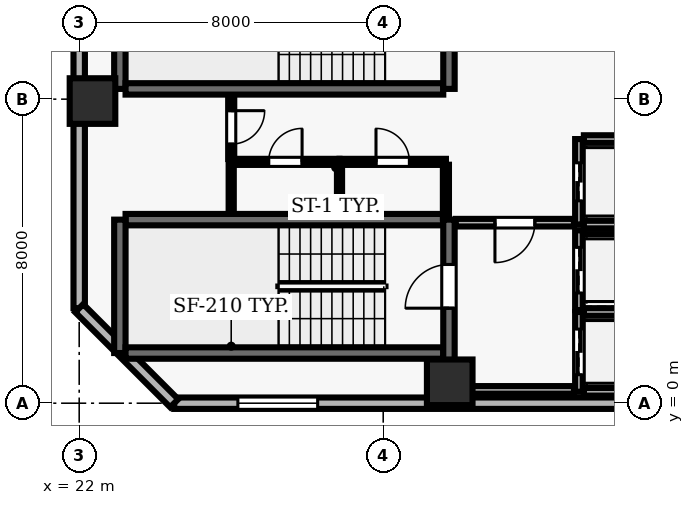
"""IFC4 building model, lengths in metres.
Left out: names, types, materials, properties, quantities, classifications, styles, units other than length and angle.
Written with IfcOpenShell. Run it as: python <this file> out.ifc"""

import sys

from ifc_helpers import new_model, si_unit, direction, frame, frame_2d, origin, origin_2d, place, context, subcontext, project, spatial, rectangle, extrude, element, fill, save


model = new_model("IFC4")
c1 = context("Model", 3, precision=1e-05, world=origin(), true_north=direction((0.0, 1.0)))
c2 = subcontext(c1, "Body", "Model", "MODEL_VIEW")
j1 = project(units=[si_unit("LENGTHUNIT", "METRE"), si_unit("PLANEANGLEUNIT", "RADIAN")], contexts=[c1])
p1 = place(None, origin())
s1 = spatial("IfcSite", under=j1, at=p1, CompositionType="ELEMENT")
p2 = place(p1, origin())
s2 = spatial("IfcBuilding", under=s1, at=p2, CompositionType="ELEMENT")
p3 = place(p2, frame((0.0, 0.0, 115.1)))
s3 = spatial("IfcBuildingStorey", under=s2, at=p3, CompositionType="ELEMENT", Elevation=115.1)
for number, where, z_axis, x_axis in (
    (1, (31.75, 0.55, 0.0), (0.0, 0.0, 1.0), (1.0, 0.0, 0.0)),
    (2, (22.35, 7.95, 0.0), (0.0, 0.0, 1.0), (1.0, 0.0, 0.0)),
):
    element("IfcColumn", number, at=place(p3, frame(where, z_axis=z_axis, x_axis=x_axis)), inside=s3, PredefinedType="COLUMN", context=c2, shape_type="SweptSolid", body=[
        extrude(rectangle(XDim=1.2, YDim=1.2, at=origin_2d()), origin(), (0.0, 0.0, 1.0), 3.9),
    ])
p4 = place(p3, frame((24.5, 0.0, 0.0), z_axis=(0.0, 0.0, 1.0), x_axis=(1.0, 0.0, 0.0)))
e3 = element("IfcWall", 3, at=p4, inside=s3, PredefinedType="SOLIDWALL", context=c2, shape_type="SweptSolid", body=[
    extrude(rectangle(XDim=43.6, YDim=0.3, at=frame_2d((21.8, 0.0))), origin(), (0.0, 0.0, 1.0), 3.69),
])
p5 = place(p4, frame((1.675, 0.0, 0.9)))
e4 = element("IfcOpeningElement", 4, at=p5, cuts=e3, PredefinedType="OPENING", context=c2, shape_type="SweptSolid", body=[
    extrude(rectangle(XDim=2.1, YDim=1.6, at=frame_2d((1.05, 0.8))), frame((0.0, 0.16, 0.0), z_axis=(0.0, -1.0, 0.0), x_axis=(1.0, 0.0, 0.0)), (0.0, 0.0, 1.0), 0.32),
])
p6 = place(p4, frame((18.025, 0.0, 0.9)))
e5 = element("IfcOpeningElement", 5, at=p6, cuts=e3, PredefinedType="OPENING", context=c2, shape_type="SweptSolid", body=[
    extrude(rectangle(XDim=2.1, YDim=1.6, at=frame_2d((1.05, 0.8))), frame((0.0, 0.16, 0.0), z_axis=(0.0, -1.0, 0.0), x_axis=(1.0, 0.0, 0.0)), (0.0, 0.0, 1.0), 0.32),
])
p7 = place(p4, frame((23.475, 0.0, 0.9)))
e6 = element("IfcOpeningElement", 6, at=p7, cuts=e3, PredefinedType="OPENING", context=c2, shape_type="SweptSolid", body=[
    extrude(rectangle(XDim=2.1, YDim=1.6, at=frame_2d((1.05, 0.8))), frame((0.0, 0.16, 0.0), z_axis=(0.0, -1.0, 0.0), x_axis=(1.0, 0.0, 0.0)), (0.0, 0.0, 1.0), 0.32),
])
p8 = place(p4, frame((28.025, 0.0, 0.9)))
e7 = element("IfcOpeningElement", 7, at=p8, cuts=e3, PredefinedType="OPENING", context=c2, shape_type="SweptSolid", body=[
    extrude(rectangle(XDim=2.1, YDim=1.6, at=frame_2d((1.05, 0.8))), frame((0.0, 0.16, 0.0), z_axis=(0.0, -1.0, 0.0), x_axis=(1.0, 0.0, 0.0)), (0.0, 0.0, 1.0), 0.32),
])
p9 = place(p4, frame((34.375, 0.0, 0.9)))
e8 = element("IfcOpeningElement", 8, at=p9, cuts=e3, PredefinedType="OPENING", context=c2, shape_type="SweptSolid", body=[
    extrude(rectangle(XDim=2.1, YDim=1.6, at=frame_2d((1.05, 0.8))), frame((0.0, 0.16, 0.0), z_axis=(0.0, -1.0, 0.0), x_axis=(1.0, 0.0, 0.0)), (0.0, 0.0, 1.0), 0.32),
])
p10 = place(p4, frame((39.825, 0.0, 0.9)))
e9 = element("IfcOpeningElement", 9, at=p10, cuts=e3, PredefinedType="OPENING", context=c2, shape_type="SweptSolid", body=[
    extrude(rectangle(XDim=2.1, YDim=1.6, at=frame_2d((1.05, 0.8))), frame((0.0, 0.16, 0.0), z_axis=(0.0, -1.0, 0.0), x_axis=(1.0, 0.0, 0.0)), (0.0, 0.0, 1.0), 0.32),
])
p11 = place(p3, frame((22.0, 46.1, 0.0), z_axis=(0.0, 0.0, 1.0), x_axis=(0.0, -1.0, 0.0)))
e10 = element("IfcWall", 10, at=p11, inside=s3, PredefinedType="SOLIDWALL", context=c2, shape_type="SweptSolid", body=[
    extrude(rectangle(XDim=43.6, YDim=0.3, at=frame_2d((21.8, 0.0))), origin(), (0.0, 0.0, 1.0), 3.69),
])
p12 = place(p11, frame((12.7, 0.0, 0.0)))
e11 = element("IfcOpeningElement", 11, at=p12, cuts=e10, PredefinedType="OPENING", context=c2, shape_type="SweptSolid", body=[
    extrude(rectangle(XDim=1.0, YDim=2.2, at=frame_2d((0.5, 1.1))), frame((0.0, 0.16, 0.0), z_axis=(0.0, -1.0, 0.0), x_axis=(1.0, 0.0, 0.0)), (0.0, 0.0, 1.0), 0.32),
])
p13 = place(p11, frame((17.125, 0.0, 0.9)))
e12 = element("IfcOpeningElement", 12, at=p13, cuts=e10, PredefinedType="OPENING", context=c2, shape_type="SweptSolid", body=[
    extrude(rectangle(XDim=2.1, YDim=1.6, at=frame_2d((1.05, 0.8))), frame((0.0, 0.16, 0.0), z_axis=(0.0, -1.0, 0.0), x_axis=(1.0, 0.0, 0.0)), (0.0, 0.0, 1.0), 0.32),
])
p14 = place(p11, frame((23.475, 0.0, 0.9)))
e13 = element("IfcOpeningElement", 13, at=p14, cuts=e10, PredefinedType="OPENING", context=c2, shape_type="SweptSolid", body=[
    extrude(rectangle(XDim=2.1, YDim=1.6, at=frame_2d((1.05, 0.8))), frame((0.0, 0.16, 0.0), z_axis=(0.0, -1.0, 0.0), x_axis=(1.0, 0.0, 0.0)), (0.0, 0.0, 1.0), 0.32),
])
p15 = place(p11, frame((28.475, 0.0, 0.9)))
e14 = element("IfcOpeningElement", 14, at=p15, cuts=e10, PredefinedType="OPENING", context=c2, shape_type="SweptSolid", body=[
    extrude(rectangle(XDim=2.1, YDim=1.6, at=frame_2d((1.05, 0.8))), frame((0.0, 0.16, 0.0), z_axis=(0.0, -1.0, 0.0), x_axis=(1.0, 0.0, 0.0)), (0.0, 0.0, 1.0), 0.32),
])
p16 = place(p11, frame((34.375, 0.0, 0.9)))
e15 = element("IfcOpeningElement", 15, at=p16, cuts=e10, PredefinedType="OPENING", context=c2, shape_type="SweptSolid", body=[
    extrude(rectangle(XDim=2.1, YDim=1.6, at=frame_2d((1.05, 0.8))), frame((0.0, 0.16, 0.0), z_axis=(0.0, -1.0, 0.0), x_axis=(1.0, 0.0, 0.0)), (0.0, 0.0, 1.0), 0.32),
])
p17 = place(p3, frame((22.0, 2.5, 0.0), z_axis=(0.0, 0.0, 1.0), x_axis=(0.707106781187, -0.707106781187, 0.0)))
e16 = element("IfcWall", 16, at=p17, inside=s3, PredefinedType="SOLIDWALL", context=c2, shape_type="SweptSolid", body=[
    extrude(rectangle(XDim=3.536, YDim=0.3, at=frame_2d((1.768, 0.0))), origin(), (0.0, 0.0, 1.0), 3.69),
])
p18 = place(p3, frame((31.58, 4.83, 0.0), z_axis=(0.0, 0.0, 1.0), x_axis=(-1.0, 0.0, 0.0)))
e17 = element("IfcWall", 17, at=p18, inside=s3, PredefinedType="SHEAR", context=c2, shape_type="SweptSolid", body=[
    extrude(rectangle(XDim=8.36, YDim=0.3, at=frame_2d((4.18, 0.0))), origin(), (0.0, 0.0, 1.0), 3.69),
])
p19 = place(p3, frame((23.07, 4.83, 0.0), z_axis=(0.0, 0.0, 1.0), x_axis=(0.0, -1.0, 0.0)))
e18 = element("IfcWall", 18, at=p19, inside=s3, PredefinedType="SHEAR", context=c2, shape_type="SweptSolid", body=[
    extrude(rectangle(XDim=3.51, YDim=0.3, at=frame_2d((1.755, 0.0))), origin(), (0.0, 0.0, 1.0), 3.69),
])
p20 = place(p3, frame((23.22, 1.32, 0.0), z_axis=(0.0, 0.0, 1.0), x_axis=(1.0, 0.0, 0.0)))
e19 = element("IfcWall", 19, at=p20, inside=s3, PredefinedType="SHEAR", context=c2, shape_type="SweptSolid", body=[
    extrude(rectangle(XDim=8.36, YDim=0.3, at=frame_2d((4.18, 0.0))), origin(), (0.0, 0.0, 1.0), 3.69),
])
p21 = place(p3, frame((31.73, 0.96, 0.0), z_axis=(0.0, 0.0, 1.0), x_axis=(0.0, 1.0, 0.0)))
e20 = element("IfcWall", 20, at=p21, inside=s3, PredefinedType="SHEAR", context=c2, shape_type="SweptSolid", body=[
    extrude(rectangle(XDim=3.87, YDim=0.3, at=frame_2d((1.935, 0.0))), origin(), (0.0, 0.0, 1.0), 3.69),
])
p22 = place(p21, frame((1.54, 0.0, 0.0)))
e21 = element("IfcOpeningElement", 21, at=p22, cuts=e20, PredefinedType="OPENING", context=c2, shape_type="SweptSolid", body=[
    extrude(rectangle(XDim=1.15, YDim=2.15, at=frame_2d((0.575, 1.075))), frame((0.0, 0.16, 0.0), z_axis=(0.0, -1.0, 0.0), x_axis=(1.0, 0.0, 0.0)), (0.0, 0.0, 1.0), 0.32),
])
p23 = place(p3, frame((23.07, 11.78, 0.0), z_axis=(0.0, 0.0, 1.0), x_axis=(0.0, -1.0, 0.0)))
e22 = element("IfcWall", 22, at=p23, inside=s3, PredefinedType="SHEAR", context=c2, shape_type="SweptSolid", body=[
    extrude(rectangle(XDim=3.51, YDim=0.3, at=frame_2d((1.755, 0.0))), origin(), (0.0, 0.0, 1.0), 3.69),
])
p24 = place(p3, frame((23.22, 8.27, 0.0), z_axis=(0.0, 0.0, 1.0), x_axis=(1.0, 0.0, 0.0)))
e23 = element("IfcWall", 23, at=p24, inside=s3, PredefinedType="SHEAR", context=c2, shape_type="SweptSolid", body=[
    extrude(rectangle(XDim=8.36, YDim=0.3, at=frame_2d((4.18, 0.0))), origin(), (0.0, 0.0, 1.0), 3.69),
])
p25 = place(p3, frame((31.73, 8.27, 0.0), z_axis=(0.0, 0.0, 1.0), x_axis=(0.0, 1.0, 0.0)))
e24 = element("IfcWall", 24, at=p25, inside=s3, PredefinedType="SHEAR", context=c2, shape_type="SweptSolid", body=[
    extrude(rectangle(XDim=3.51, YDim=0.3, at=frame_2d((1.755, 0.0))), origin(), (0.0, 0.0, 1.0), 3.69),
])
p26 = place(p25, frame((1.18, 0.0, 0.0)))
e25 = element("IfcOpeningElement", 25, at=p26, cuts=e24, PredefinedType="OPENING", context=c2, shape_type="SweptSolid", body=[
    extrude(rectangle(XDim=1.15, YDim=2.15, at=frame_2d((0.575, 1.075))), frame((0.0, 0.16, 0.0), z_axis=(0.0, -1.0, 0.0), x_axis=(1.0, 0.0, 0.0)), (0.0, 0.0, 1.0), 0.32),
])
p27 = place(p3, frame((35.15, 2.4, 0.0), z_axis=(0.0, 0.0, 1.0), x_axis=(0.0, -1.0, 0.0)))
e26 = element("IfcWall", 26, at=p27, inside=s3, PredefinedType="SOLIDWALL", context=c2, shape_type="SweptSolid", body=[
    extrude(rectangle(XDim=2.1, YDim=0.2, at=frame_2d((1.05, 0.0))), origin(), (0.0, 0.0, 1.0), 3.69),
])
p28 = place(p27, frame((0.45, 0.0, 0.0)))
e27 = element("IfcOpeningElement", 27, at=p28, cuts=e26, PredefinedType="OPENING", context=c2, shape_type="SweptSolid", body=[
    extrude(rectangle(XDim=1.2, YDim=2.15, at=frame_2d((0.6, 1.075))), frame((0.0, 0.11, 0.0), z_axis=(0.0, -1.0, 0.0), x_axis=(1.0, 0.0, 0.0)), (0.0, 0.0, 1.0), 0.22),
])
for number, where, z_axis, x_axis in (
    (28, (35.28, 0.3, 0.0), (0.0, 0.0, 1.0), (1.0, 0.0, 0.0)),
    (29, (37.42, 2.4, 0.0), (0.0, 0.0, 1.0), (-1.0, 0.0, 0.0)),
):
    element("IfcWall", number, at=place(p3, frame(where, z_axis=z_axis, x_axis=x_axis)), inside=s3, PredefinedType="SOLIDWALL", context=c2, shape_type="SweptSolid", body=[
        extrude(rectangle(XDim=2.14, YDim=0.2, at=frame_2d((1.07, 0.0))), origin(), (0.0, 0.0, 1.0), 3.69),
    ])
p29 = place(p3, frame((35.15, 4.55, 0.0), z_axis=(0.0, 0.0, 1.0), x_axis=(0.0, -1.0, 0.0)))
e30 = element("IfcWall", 30, at=p29, inside=s3, PredefinedType="SOLIDWALL", context=c2, shape_type="SweptSolid", body=[
    extrude(rectangle(XDim=2.1, YDim=0.2, at=frame_2d((1.05, 0.0))), origin(), (0.0, 0.0, 1.0), 3.69),
])
p30 = place(p29, frame((0.45, 0.0, 0.0)))
e31 = element("IfcOpeningElement", 31, at=p30, cuts=e30, PredefinedType="OPENING", context=c2, shape_type="SweptSolid", body=[
    extrude(rectangle(XDim=1.2, YDim=2.15, at=frame_2d((0.6, 1.075))), frame((0.0, 0.11, 0.0), z_axis=(0.0, -1.0, 0.0), x_axis=(1.0, 0.0, 0.0)), (0.0, 0.0, 1.0), 0.22),
])
p31 = place(p3, frame((37.42, 4.55, 0.0), z_axis=(0.0, 0.0, 1.0), x_axis=(-1.0, 0.0, 0.0)))
e32 = element("IfcWall", 32, at=p31, inside=s3, PredefinedType="SOLIDWALL", context=c2, shape_type="SweptSolid", body=[
    extrude(rectangle(XDim=2.14, YDim=0.2, at=frame_2d((1.07, 0.0))), origin(), (0.0, 0.0, 1.0), 3.69),
])
p32 = place(p3, frame((35.15, 6.95, 0.0), z_axis=(0.0, 0.0, 1.0), x_axis=(0.0, -1.0, 0.0)))
e33 = element("IfcWall", 33, at=p32, inside=s3, PredefinedType="SOLIDWALL", context=c2, shape_type="SweptSolid", body=[
    extrude(rectangle(XDim=2.25, YDim=0.2, at=frame_2d((1.125, 0.0))), origin(), (0.0, 0.0, 1.0), 3.69),
])
p33 = place(p32, frame((0.625, 0.0, 0.0)))
e34 = element("IfcOpeningElement", 34, at=p33, cuts=e33, PredefinedType="OPENING", context=c2, shape_type="SweptSolid", body=[
    extrude(rectangle(XDim=1.0, YDim=2.1, at=frame_2d((0.5, 1.05))), frame((0.0, 0.11, 0.0), z_axis=(0.0, -1.0, 0.0), x_axis=(1.0, 0.0, 0.0)), (0.0, 0.0, 1.0), 0.22),
])
for number, where, z_axis, x_axis in (
    (35, (35.28, 4.7, 0.0), (0.0, 0.0, 1.0), (1.0, 0.0, 0.0)),
    (36, (37.42, 6.95, 0.0), (0.0, 0.0, 1.0), (-1.0, 0.0, 0.0)),
):
    element("IfcWall", number, at=place(p3, frame(where, z_axis=z_axis, x_axis=x_axis)), inside=s3, PredefinedType="SOLIDWALL", context=c2, shape_type="SweptSolid", body=[
        extrude(rectangle(XDim=2.14, YDim=0.2, at=frame_2d((1.07, 0.0))), origin(), (0.0, 0.0, 1.0), 3.69),
    ])
p34 = place(p3, frame((26.0, 6.35, 0.0), z_axis=(0.0, 0.0, 1.0), x_axis=(1.0, 0.0, 0.0)))
e37 = element("IfcWall", 37, at=p34, inside=s3, PredefinedType="PARTITIONING", context=c2, shape_type="SweptSolid", body=[
    extrude(rectangle(XDim=2.85, YDim=0.16, at=frame_2d((1.425, 0.0))), origin(), (0.0, 0.0, 1.0), 3.69),
])
p35 = place(p34, frame((0.985, 0.0, 0.0)))
e38 = element("IfcOpeningElement", 38, at=p35, cuts=e37, PredefinedType="OPENING", context=c2, shape_type="SweptSolid", body=[
    extrude(rectangle(XDim=0.88, YDim=2.1, at=frame_2d((0.44, 1.05))), frame((0.0, 0.09, 0.0), z_axis=(0.0, -1.0, 0.0), x_axis=(1.0, 0.0, 0.0)), (0.0, 0.0, 1.0), 0.18),
])
p36 = place(p3, frame((28.85, 6.35, 0.0), z_axis=(0.0, 0.0, 1.0), x_axis=(1.0, 0.0, 0.0)))
e39 = element("IfcWall", 39, at=p36, inside=s3, PredefinedType="PARTITIONING", context=c2, shape_type="SweptSolid", body=[
    extrude(rectangle(XDim=2.8, YDim=0.16, at=frame_2d((1.4, 0.0))), origin(), (0.0, 0.0, 1.0), 3.69),
])
p37 = place(p36, frame((0.96, 0.0, 0.0)))
e40 = element("IfcOpeningElement", 40, at=p37, cuts=e39, PredefinedType="OPENING", context=c2, shape_type="SweptSolid", body=[
    extrude(rectangle(XDim=0.88, YDim=2.1, at=frame_2d((0.44, 1.05))), frame((0.0, 0.09, 0.0), z_axis=(0.0, -1.0, 0.0), x_axis=(1.0, 0.0, 0.0)), (0.0, 0.0, 1.0), 0.18),
])
p38 = place(p3, frame((31.65, 0.35, 0.0), z_axis=(0.0, 0.0, 1.0), x_axis=(1.0, 0.0, 0.0)))
e41 = element("IfcWall", 41, at=p38, inside=s3, PredefinedType="SOLIDWALL", context=c2, shape_type="SweptSolid", body=[
    extrude(rectangle(XDim=3.37, YDim=0.2, at=frame_2d((1.685, 0.0))), origin(), (0.0, 0.0, 1.0), 3.69),
])
p39 = place(p3, frame((35.02, 4.75, 0.0), z_axis=(0.0, 0.0, 1.0), x_axis=(-1.0, 0.0, 0.0)))
e42 = element("IfcWall", 42, at=p39, inside=s3, PredefinedType="SOLIDWALL", context=c2, shape_type="SweptSolid", body=[
    extrude(rectangle(XDim=3.11, YDim=0.2, at=frame_2d((1.555, 0.0))), origin(), (0.0, 0.0, 1.0), 3.69),
])
p40 = place(p39, frame((1.03, 0.0, 0.0)))
e43 = element("IfcOpeningElement", 43, at=p40, cuts=e42, PredefinedType="OPENING", context=c2, shape_type="SweptSolid", body=[
    extrude(rectangle(XDim=1.05, YDim=2.15, at=frame_2d((0.525, 1.075))), frame((0.0, 0.11, 0.0), z_axis=(0.0, -1.0, 0.0), x_axis=(1.0, 0.0, 0.0)), (0.0, 0.0, 1.0), 0.22),
])
p41 = place(p3, frame((26.0, 5.01, 0.0), z_axis=(0.0, 0.0, 1.0), x_axis=(0.0, 1.0, 0.0)))
e44 = element("IfcWall", 44, at=p41, inside=s3, PredefinedType="PARTITIONING", context=c2, shape_type="SweptSolid", body=[
    extrude(rectangle(XDim=1.265, YDim=0.135, at=frame_2d((0.632, 0.0))), origin(), (0.0, 0.0, 1.0), 3.69),
])
p42 = place(p3, frame((26.0, 8.09, 0.0), z_axis=(0.0, 0.0, 1.0), x_axis=(0.0, -1.0, 0.0)))
e45 = element("IfcWall", 45, at=p42, inside=s3, PredefinedType="PARTITIONING", context=c2, shape_type="SweptSolid", body=[
    extrude(rectangle(XDim=1.665, YDim=0.16, at=frame_2d((0.833, 0.0))), origin(), (0.0, 0.0, 1.0), 3.69),
])
p43 = place(p42, frame((0.393, 0.0, 0.0)))
e46 = element("IfcOpeningElement", 46, at=p43, cuts=e45, PredefinedType="OPENING", context=c2, shape_type="SweptSolid", body=[
    extrude(rectangle(XDim=0.88, YDim=2.1, at=frame_2d((0.44, 1.05))), frame((0.0, 0.09, 0.0), z_axis=(0.0, -1.0, 0.0), x_axis=(1.0, 0.0, 0.0)), (0.0, 0.0, 1.0), 0.18),
])
p44 = place(p3, frame((28.85, 5.01, 0.0), z_axis=(0.0, 0.0, 1.0), x_axis=(0.0, 1.0, 0.0)))
e47 = element("IfcWall", 47, at=p44, inside=s3, PredefinedType="PARTITIONING", context=c2, shape_type="SweptSolid", body=[
    extrude(rectangle(XDim=1.265, YDim=0.135, at=frame_2d((0.632, 0.0))), origin(), (0.0, 0.0, 1.0), 3.69),
])
p45 = place(p3, frame((31.65, 4.86, 0.0), z_axis=(0.0, 0.0, 1.0), x_axis=(0.0, 1.0, 0.0)))
e48 = element("IfcWall", 48, at=p45, inside=s3, PredefinedType="PARTITIONING", context=c2, shape_type="SweptSolid", body=[
    extrude(rectangle(XDim=1.415, YDim=0.16, at=frame_2d((0.708, 0.0))), origin(), (0.0, 0.0, 1.0), 3.69),
])
p46 = place(p5, origin())
e49 = element("IfcWindow", 49, at=p46, inside=s3, PartitioningType="SINGLE_PANEL", PredefinedType="WINDOW", context=c2, shape_type="SweptSolid", body=[
    extrude(rectangle(XDim=2.1, YDim=1.6, at=frame_2d((1.05, 0.8))), frame((0.0, 0.03, 0.0), z_axis=(0.0, -1.0, 0.0), x_axis=(1.0, 0.0, 0.0)), (0.0, 0.0, 1.0), 0.06),
])
fill(e4, e49)
p47 = place(p22, origin())
e50 = element("IfcDoor", 50, at=p47, inside=s3, OperationType="SINGLE_SWING_LEFT", PredefinedType="DOOR", context=c2, shape_type="SweptSolid", body=[
    extrude(rectangle(XDim=1.15, YDim=2.15, at=frame_2d((0.575, 1.075))), frame((0.0, 0.025, 0.0), z_axis=(0.0, -1.0, 0.0), x_axis=(1.0, 0.0, 0.0)), (0.0, 0.0, 1.0), 0.05),
])
fill(e21, e50)
p48 = place(p28, origin())
e51 = element("IfcDoor", 51, at=p48, inside=s3, OperationType="DOUBLE_DOOR_SLIDING", PredefinedType="DOOR", context=c2, shape_type="SweptSolid", body=[
    extrude(rectangle(XDim=1.2, YDim=2.15, at=frame_2d((0.6, 1.075))), frame((0.0, 0.025, 0.0), z_axis=(0.0, -1.0, 0.0), x_axis=(1.0, 0.0, 0.0)), (0.0, 0.0, 1.0), 0.05),
])
fill(e27, e51)
p49 = place(p30, origin())
e52 = element("IfcDoor", 52, at=p49, inside=s3, OperationType="DOUBLE_DOOR_SLIDING", PredefinedType="DOOR", context=c2, shape_type="SweptSolid", body=[
    extrude(rectangle(XDim=1.2, YDim=2.15, at=frame_2d((0.6, 1.075))), frame((0.0, 0.025, 0.0), z_axis=(0.0, -1.0, 0.0), x_axis=(1.0, 0.0, 0.0)), (0.0, 0.0, 1.0), 0.05),
])
fill(e31, e52)
p50 = place(p33, origin())
e53 = element("IfcDoor", 53, at=p50, inside=s3, OperationType="DOUBLE_DOOR_SLIDING", PredefinedType="DOOR", context=c2, shape_type="SweptSolid", body=[
    extrude(rectangle(XDim=1.0, YDim=2.1, at=frame_2d((0.5, 1.05))), frame((0.0, 0.025, 0.0), z_axis=(0.0, -1.0, 0.0), x_axis=(1.0, 0.0, 0.0)), (0.0, 0.0, 1.0), 0.05),
])
fill(e34, e53)
p51 = place(p40, origin())
e54 = element("IfcDoor", 54, at=p51, inside=s3, OperationType="SINGLE_SWING_RIGHT", PredefinedType="DOOR", context=c2, shape_type="SweptSolid", body=[
    extrude(rectangle(XDim=1.05, YDim=2.15, at=frame_2d((0.525, 1.075))), frame((0.0, 0.025, 0.0), z_axis=(0.0, -1.0, 0.0), x_axis=(1.0, 0.0, 0.0)), (0.0, 0.0, 1.0), 0.05),
])
fill(e43, e54)
p52 = place(p43, origin())
e55 = element("IfcDoor", 55, at=p52, inside=s3, OperationType="SINGLE_SWING_LEFT", PredefinedType="DOOR", context=c2, shape_type="SweptSolid", body=[
    extrude(rectangle(XDim=0.88, YDim=2.1, at=frame_2d((0.44, 1.05))), frame((0.0, 0.025, 0.0), z_axis=(0.0, -1.0, 0.0), x_axis=(1.0, 0.0, 0.0)), (0.0, 0.0, 1.0), 0.05),
])
fill(e46, e55)
p53 = place(p35, origin())
e56 = element("IfcDoor", 56, at=p53, inside=s3, OperationType="SINGLE_SWING_RIGHT", PredefinedType="DOOR", context=c2, shape_type="SweptSolid", body=[
    extrude(rectangle(XDim=0.88, YDim=2.1, at=frame_2d((0.44, 1.05))), frame((0.0, 0.025, 0.0), z_axis=(0.0, -1.0, 0.0), x_axis=(1.0, 0.0, 0.0)), (0.0, 0.0, 1.0), 0.05),
])
fill(e38, e56)
p54 = place(p37, origin())
e57 = element("IfcDoor", 57, at=p54, inside=s3, OperationType="SINGLE_SWING_LEFT", PredefinedType="DOOR", context=c2, shape_type="SweptSolid", body=[
    extrude(rectangle(XDim=0.88, YDim=2.1, at=frame_2d((0.44, 1.05))), frame((0.0, 0.025, 0.0), z_axis=(0.0, -1.0, 0.0), x_axis=(1.0, 0.0, 0.0)), (0.0, 0.0, 1.0), 0.05),
])
fill(e40, e57)
save(model, sys.argv[1])
